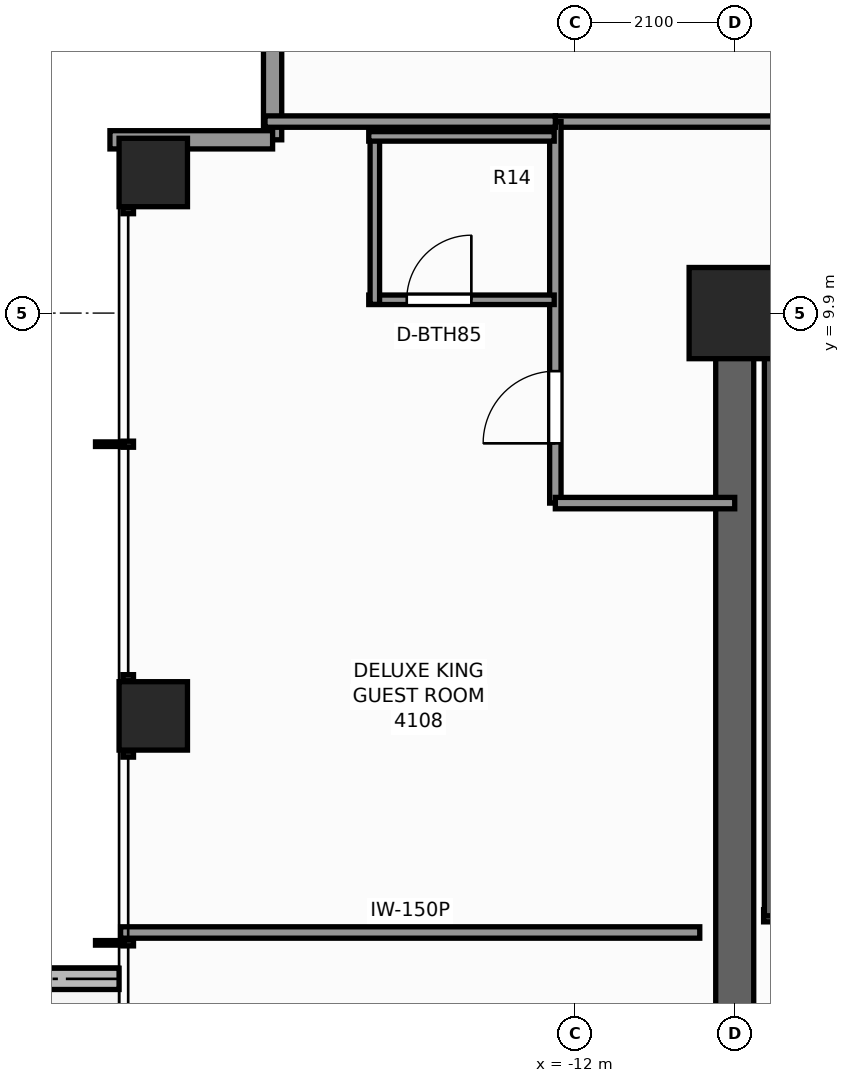
"""IFC4 building model, lengths in metres.
Left out: names, types, materials, properties, quantities, classifications, styles, units other than length and angle.
Written with IfcOpenShell. Run it as: python <this file> out.ifc"""

import sys

from ifc_helpers import new_model, si_unit, direction, frame, frame_2d, origin, origin_2d, place, context, subcontext, project, spatial, rectangle, extrude, element, fill, save


model = new_model("IFC4")
c1 = context("Model", 3, precision=1e-05, world=origin(), true_north=direction((0.0, 1.0)))
c2 = subcontext(c1, "Body", "Model", "MODEL_VIEW")
j1 = project(units=[si_unit("LENGTHUNIT", "METRE"), si_unit("PLANEANGLEUNIT", "RADIAN")], contexts=[c1])
p1 = place(None, origin())
s1 = spatial("IfcSite", under=j1, at=p1, CompositionType="ELEMENT")
p2 = place(p1, origin())
s2 = spatial("IfcBuilding", under=s1, at=p2, CompositionType="ELEMENT")
p3 = place(p2, frame((0.0, 0.0, 141.5)))
s3 = spatial("IfcBuildingStorey", under=s2, at=p3, CompositionType="ELEMENT", Elevation=141.5)
p4 = place(p3, frame((-10.15, 9.9, 0.0), z_axis=(0.0, 0.0, 1.0), x_axis=(1.0, 0.0, 0.0)))
e1 = element("IfcWall", 1, at=p4, inside=s3, PredefinedType="SHEAR", context=c2, shape_type="SweptSolid", body=[
    extrude(rectangle(XDim=14.57, YDim=0.5, at=frame_2d((7.285, 0.0))), origin(), (0.0, 0.0, 1.0), 3.3),
])
p5 = place(p3, frame((-9.9, -3.7, 0.0), z_axis=(0.0, 0.0, 1.0), x_axis=(0.0, 1.0, 0.0)))
e2 = element("IfcWall", 2, at=p5, inside=s3, PredefinedType="SHEAR", context=c2, shape_type="SweptSolid", body=[
    extrude(rectangle(XDim=13.35, YDim=0.5, at=frame_2d((6.675, 0.0))), origin(), (0.0, 0.0, 1.0), 3.3),
])
p6 = place(p5, frame((0.35, 0.0, 0.0)))
e3 = element("IfcOpeningElement", 3, at=p6, cuts=e2, PredefinedType="OPENING", context=c2, shape_type="SweptSolid", body=[
    extrude(rectangle(XDim=1.1, YDim=2.2, at=frame_2d((0.55, 1.1))), frame((0.0, 0.26, 0.0), z_axis=(0.0, -1.0, 0.0), x_axis=(1.0, 0.0, 0.0)), (0.0, 0.0, 1.0), 0.52),
])
p7 = place(p3, frame((-9.9, 9.9, 0.0), z_axis=(0.0, 0.0, 1.0), x_axis=(1.0, 0.0, 0.0)))
e4 = element("IfcColumn", 4, at=p7, inside=s3, PredefinedType="COLUMN", context=c2, shape_type="SweptSolid", body=[
    extrude(rectangle(XDim=1.2, YDim=1.2, at=origin_2d()), origin(), (0.0, 0.0, 1.0), 3.3),
])
for number, where, z_axis, x_axis in (
    (5, (-17.55, 4.6, 0.0), (0.0, 0.0, 1.0), (1.0, 0.0, 0.0)),
    (6, (-17.55, 11.75, 0.0), (0.0, 0.0, 1.0), (1.0, 0.0, 0.0)),
):
    element("IfcColumn", number, at=place(p3, frame(where, z_axis=z_axis, x_axis=x_axis)), inside=s3, PredefinedType="COLUMN", context=c2, shape_type="SweptSolid", body=[
        extrude(rectangle(XDim=0.9, YDim=0.9, at=origin_2d()), origin(), (0.0, 0.0, 1.0), 3.3),
    ])
p8 = place(p3, frame((-18.0, 1.14, -0.02), z_axis=(0.0, 0.0, 1.0), x_axis=(-1.0, 0.0, 0.0)))
e7 = element("IfcWall", 7, at=p8, inside=s3, PredefinedType="PARAPET", context=c2, shape_type="SweptSolid", body=[
    extrude(rectangle(XDim=3.3, YDim=0.28, at=frame_2d((1.65, 0.0))), origin(), (0.0, 0.0, 1.0), 0.42),
])
for number, where, z_axis, x_axis in (
    (8, (-15.98, 12.18, 0.0), (0.0, 0.0, 1.0), (0.0, 1.0, 0.0)),
    (9, (-18.12, 12.18, 0.0), (0.0, 0.0, 1.0), (1.0, 0.0, 0.0)),
):
    element("IfcWall", number, at=place(p3, frame(where, z_axis=z_axis, x_axis=x_axis)), inside=s3, PredefinedType="STANDARD", context=c2, shape_type="SweptSolid", body=[
        extrude(rectangle(XDim=2.14, YDim=0.24, at=frame_2d((1.07, 0.0))), origin(), (0.0, 0.0, 1.0), 2.479),
    ])
p9 = place(p3, frame((-9.52, 1.97, 0.0), z_axis=(0.0, 0.0, 1.0), x_axis=(1.0, 0.0, 0.0)))
e10 = element("IfcWall", 10, at=p9, inside=s3, PredefinedType="SHEAR", context=c2, shape_type="SweptSolid", body=[
    extrude(rectangle(XDim=3.52, YDim=0.16, at=frame_2d((1.76, 0.0))), origin(), (0.0, 0.0, 1.0), 3.3),
])
p10 = place(p9, frame((1.15, 0.0, 0.0)))
e11 = element("IfcOpeningElement", 11, at=p10, cuts=e10, PredefinedType="OPENING", context=c2, shape_type="SweptSolid", body=[
    extrude(rectangle(XDim=1.1, YDim=2.2, at=frame_2d((0.55, 1.1))), frame((0.0, 0.09, 0.0), z_axis=(0.0, -1.0, 0.0), x_axis=(1.0, 0.0, 0.0)), (0.0, 0.0, 1.0), 0.18),
])
p11 = place(p3, frame((-9.52, 9.53, 0.0), z_axis=(0.0, 0.0, 1.0), x_axis=(1.0, 0.0, 0.0)))
e12 = element("IfcWall", 12, at=p11, inside=s3, PredefinedType="SHEAR", context=c2, shape_type="SweptSolid", body=[
    extrude(rectangle(XDim=3.52, YDim=0.16, at=frame_2d((1.76, 0.0))), origin(), (0.0, 0.0, 1.0), 3.3),
])
p12 = place(p3, frame((-9.43, 1.97, 0.0), z_axis=(0.0, 0.0, 1.0), x_axis=(0.0, 1.0, 0.0)))
e13 = element("IfcWall", 13, at=p12, inside=s3, PredefinedType="SHEAR", context=c2, shape_type="SweptSolid", body=[
    extrude(rectangle(XDim=7.56, YDim=0.16, at=frame_2d((3.78, 0.0))), origin(), (0.0, 0.0, 1.0), 3.3),
])
p13 = place(p3, frame((-12.26, 12.42, 0.0), z_axis=(0.0, 0.0, 1.0), x_axis=(1.0, 0.0, 0.0)))
e14 = element("IfcWall", 14, at=p13, inside=s3, PredefinedType="PARTITIONING", context=c2, shape_type="SweptSolid", body=[
    extrude(rectangle(XDim=24.68, YDim=0.15, at=frame_2d((12.34, 0.0))), origin(), (0.0, 0.0, 1.0), 2.312),
])
p14 = place(p13, frame((2.93, 0.0, 0.0)))
e15 = element("IfcOpeningElement", 15, at=p14, cuts=e14, PredefinedType="OPENING", context=c2, shape_type="SweptSolid", body=[
    extrude(rectangle(XDim=0.9, YDim=2.06, at=frame_2d((0.45, 1.03))), frame((0.0, 0.085, 0.0), z_axis=(0.0, -1.0, 0.0), x_axis=(1.0, 0.0, 0.0)), (0.0, 0.0, 1.0), 0.17),
])
p15 = place(p13, frame((5.09, 0.0, 0.0)))
e16 = element("IfcOpeningElement", 16, at=p15, cuts=e14, PredefinedType="OPENING", context=c2, shape_type="SweptSolid", body=[
    extrude(rectangle(XDim=0.9, YDim=2.06, at=frame_2d((0.45, 1.03))), frame((0.0, 0.085, 0.0), z_axis=(0.0, -1.0, 0.0), x_axis=(1.0, 0.0, 0.0)), (0.0, 0.0, 1.0), 0.17),
])
p16 = place(p13, frame((9.092, 0.0, 0.0)))
e17 = element("IfcOpeningElement", 17, at=p16, cuts=e14, PredefinedType="OPENING", context=c2, shape_type="SweptSolid", body=[
    extrude(rectangle(XDim=0.95, YDim=2.06, at=frame_2d((0.475, 1.03))), frame((0.0, 0.085, 0.0), z_axis=(0.0, -1.0, 0.0), x_axis=(1.0, 0.0, 0.0)), (0.0, 0.0, 1.0), 0.17),
])
p17 = place(p13, frame((13.84, 0.0, 0.0)))
e18 = element("IfcOpeningElement", 18, at=p17, cuts=e14, PredefinedType="OPENING", context=c2, shape_type="SweptSolid", body=[
    extrude(rectangle(XDim=0.9, YDim=2.06, at=frame_2d((0.45, 1.03))), frame((0.0, 0.085, 0.0), z_axis=(0.0, -1.0, 0.0), x_axis=(1.0, 0.0, 0.0)), (0.0, 0.0, 1.0), 0.17),
])
p18 = place(p13, frame((20.256, 0.0, 0.0)))
e19 = element("IfcOpeningElement", 19, at=p18, cuts=e14, PredefinedType="OPENING", context=c2, shape_type="SweptSolid", body=[
    extrude(rectangle(XDim=0.9, YDim=2.06, at=frame_2d((0.45, 1.03))), frame((0.0, 0.085, 0.0), z_axis=(0.0, -1.0, 0.0), x_axis=(1.0, 0.0, 0.0)), (0.0, 0.0, 1.0), 0.17),
])
p19 = place(p3, frame((-12.26, 7.4, 0.0), z_axis=(0.0, 0.0, 1.0), x_axis=(0.0, 1.0, 0.0)))
e20 = element("IfcWall", 20, at=p19, inside=s3, PredefinedType="PARTITIONING", context=c2, shape_type="SweptSolid", body=[
    extrude(rectangle(XDim=5.02, YDim=0.15, at=frame_2d((2.51, 0.0))), origin(), (0.0, 0.0, 1.0), 2.312),
])
p20 = place(p19, frame((0.786, 0.0, 0.0)))
e21 = element("IfcOpeningElement", 21, at=p20, cuts=e20, PredefinedType="OPENING", context=c2, shape_type="SweptSolid", body=[
    extrude(rectangle(XDim=0.95, YDim=2.06, at=frame_2d((0.475, 1.03))), frame((0.0, 0.085, 0.0), z_axis=(0.0, -1.0, 0.0), x_axis=(1.0, 0.0, 0.0)), (0.0, 0.0, 1.0), 0.17),
])
p21 = place(p3, frame((-12.26, 7.4, 0.0), z_axis=(0.0, 0.0, 1.0), x_axis=(1.0, 0.0, 0.0)))
e22 = element("IfcWall", 22, at=p21, inside=s3, PredefinedType="PARTITIONING", context=c2, shape_type="SweptSolid", body=[
    extrude(rectangle(XDim=2.36, YDim=0.15, at=frame_2d((1.18, 0.0))), origin(), (0.0, 0.0, 1.0), 3.1),
])
p22 = place(p3, frame((-16.08, 12.42, 0.0), z_axis=(0.0, 0.0, 1.0), x_axis=(1.0, 0.0, 0.0)))
e23 = element("IfcWall", 23, at=p22, inside=s3, PredefinedType="PARTITIONING", context=c2, shape_type="SweptSolid", body=[
    extrude(rectangle(XDim=3.82, YDim=0.15, at=frame_2d((1.91, 0.0))), origin(), (0.0, 0.0, 1.0), 3.1),
])
p23 = place(p3, frame((-17.98, 1.75, 0.0), z_axis=(0.0, 0.0, 1.0), x_axis=(1.0, 0.0, 0.0)))
e24 = element("IfcWall", 24, at=p23, inside=s3, PredefinedType="PARTITIONING", context=c2, shape_type="SweptSolid", body=[
    extrude(rectangle(XDim=7.62, YDim=0.15, at=frame_2d((3.81, 0.0))), origin(), (0.0, 0.0, 1.0), 2.469),
])
p24 = place(p3, frame((-14.715, 10.075, 0.0), z_axis=(0.0, 0.0, 1.0), x_axis=(1.0, 0.0, 0.0)))
e25 = element("IfcWall", 25, at=p24, inside=s3, PredefinedType="PARTITIONING", context=c2, shape_type="SweptSolid", body=[
    extrude(rectangle(XDim=2.44, YDim=0.125, at=frame_2d((1.22, 0.0))), origin(), (0.0, 0.0, 1.0), 3.1),
])
p25 = place(p24, frame((0.5, 0.0, 0.0)))
e26 = element("IfcOpeningElement", 26, at=p25, cuts=e25, PredefinedType="OPENING", context=c2, shape_type="SweptSolid", body=[
    extrude(rectangle(XDim=0.85, YDim=2.03, at=frame_2d((0.425, 1.015))), frame((0.0, 0.073, 0.0), z_axis=(0.0, -1.0, 0.0), x_axis=(1.0, 0.0, 0.0)), (0.0, 0.0, 1.0), 0.145),
])
p26 = place(p3, frame((-14.635, 10.015, 0.0), z_axis=(0.0, 0.0, 1.0), x_axis=(0.0, 1.0, 0.0)))
e27 = element("IfcWall", 27, at=p26, inside=s3, PredefinedType="PARTITIONING", context=c2, shape_type="SweptSolid", body=[
    extrude(rectangle(XDim=2.27, YDim=0.125, at=frame_2d((1.135, 0.0))), origin(), (0.0, 0.0, 1.0), 2.312),
])
p27 = place(p3, frame((-14.715, 12.225, 0.0), z_axis=(0.0, 0.0, 1.0), x_axis=(1.0, 0.0, 0.0)))
e28 = element("IfcWall", 28, at=p27, inside=s3, PredefinedType="PARTITIONING", context=c2, shape_type="SweptSolid", body=[
    extrude(rectangle(XDim=2.44, YDim=0.125, at=frame_2d((1.22, 0.0))), origin(), (0.0, 0.0, 1.0), 3.1),
])
p28 = place(p25, origin())
e29 = element("IfcDoor", 29, at=p28, inside=s3, OperationType="SINGLE_SWING_RIGHT", PredefinedType="DOOR", context=c2, shape_type="SweptSolid", body=[
    extrude(rectangle(XDim=0.85, YDim=2.03, at=frame_2d((0.425, 1.015))), frame((0.0, 0.025, 0.0), z_axis=(0.0, -1.0, 0.0), x_axis=(1.0, 0.0, 0.0)), (0.0, 0.0, 1.0), 0.05),
])
fill(e26, e29)
p29 = place(p20, origin())
e30 = element("IfcDoor", 30, at=p29, inside=s3, OperationType="SINGLE_SWING_LEFT", PredefinedType="DOOR", context=c2, shape_type="SweptSolid", body=[
    extrude(rectangle(XDim=0.95, YDim=2.06, at=frame_2d((0.475, 1.03))), frame((0.0, 0.025, 0.0), z_axis=(0.0, -1.0, 0.0), x_axis=(1.0, 0.0, 0.0)), (0.0, 0.0, 1.0), 0.05),
])
fill(e21, e30)
save(model, sys.argv[1])
